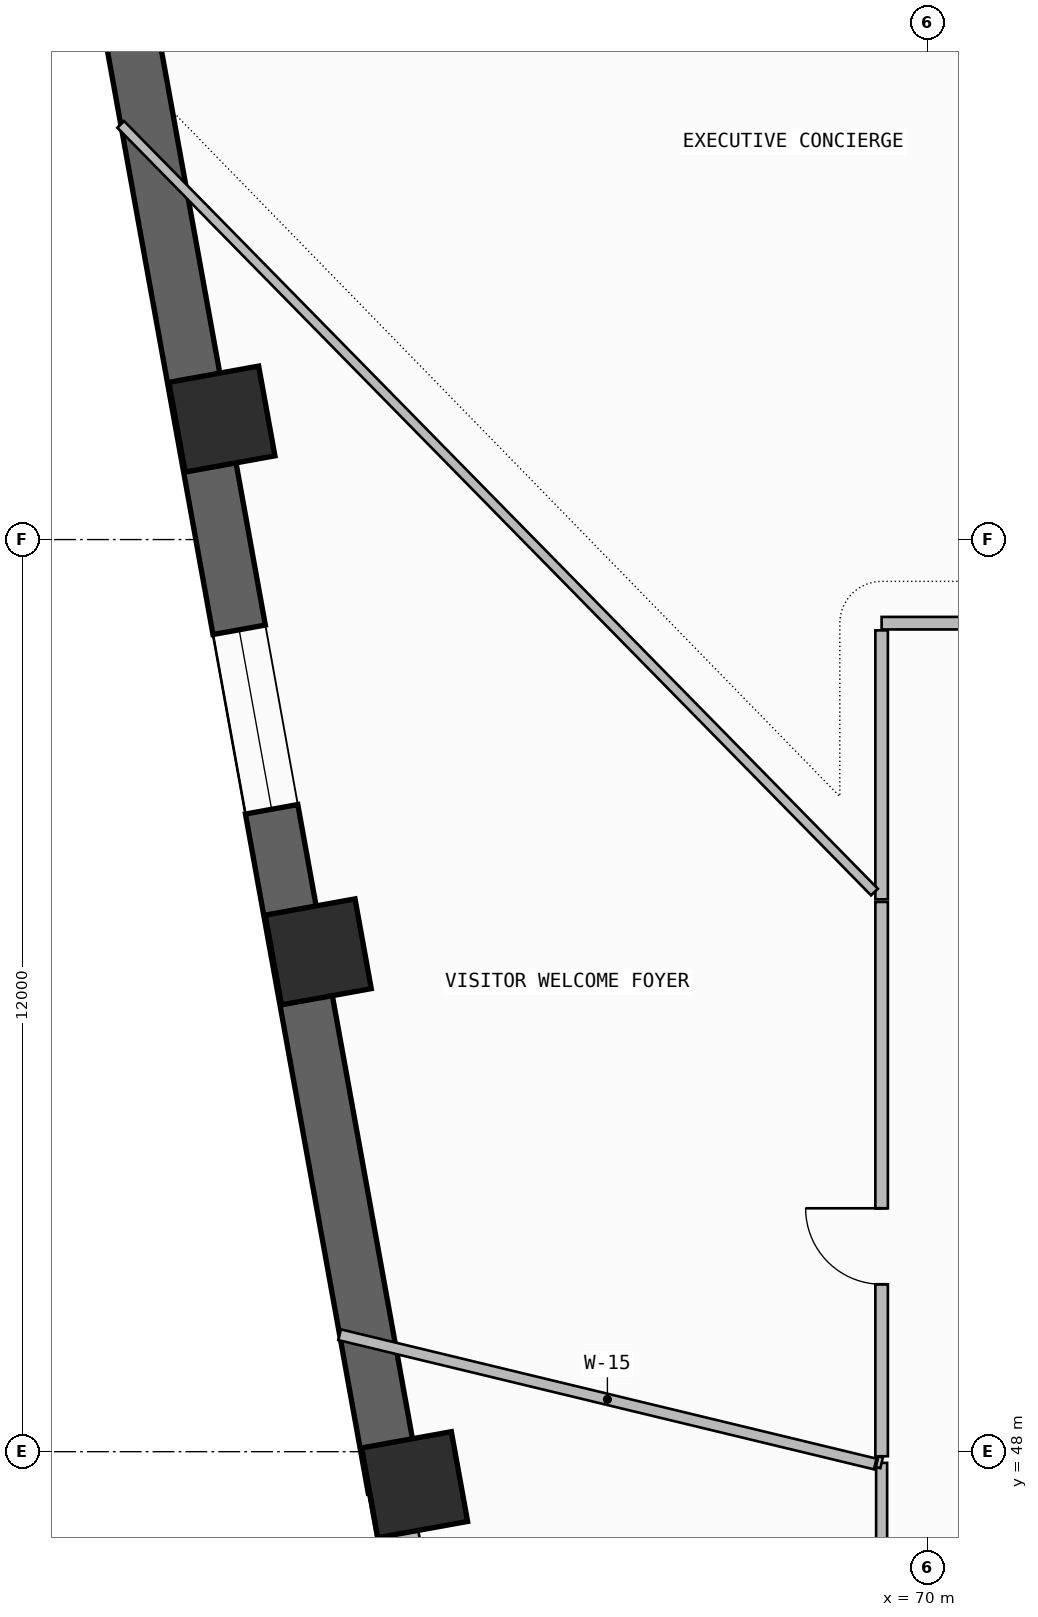
"""IFC4 building model, lengths in metres.
Left out: names, types, materials, properties, quantities, classifications, styles, units other than length and angle.
Written with IfcOpenShell. Run it as: python <this file> out.ifc"""

import sys

from ifc_helpers import new_model, si_unit, direction, frame, frame_2d, origin, origin_2d, place, context, subcontext, project, spatial, rectangle, extrude, element, fill, save


model = new_model("IFC4")
c1 = context("Model", 3, precision=1e-05, world=origin(), true_north=direction((0.0, 1.0)))
c2 = subcontext(c1, "Body", "Model", "MODEL_VIEW")
j1 = project(units=[si_unit("LENGTHUNIT", "METRE"), si_unit("PLANEANGLEUNIT", "RADIAN")], contexts=[c1])
p1 = place(None, origin())
s1 = spatial("IfcSite", under=j1, at=p1, CompositionType="ELEMENT")
p2 = place(p1, origin())
s2 = spatial("IfcBuilding", under=s1, at=p2, CompositionType="ELEMENT")
p3 = place(p2, frame((0.0, 0.0, 99.3)))
s3 = spatial("IfcBuildingStorey", under=s2, at=p3, CompositionType="ELEMENT", Elevation=99.3)
for number, where, z_axis, x_axis in (
    (1, (60.72, 61.585, 0.0), (0.0, 0.0, 1.0), (-0.178, 0.984, 0.0)),
    (2, (61.988, 54.575, 0.0), (0.0, 0.0, 1.0), (-0.178, 0.984, 0.0)),
    (3, (63.255, 47.566, 0.0), (0.0, 0.0, 1.0), (-0.178, 0.984, 0.0)),
):
    element("IfcColumn", number, at=place(p3, frame(where, z_axis=z_axis, x_axis=x_axis)), inside=s3, PredefinedType="COLUMN", context=c2, shape_type="SweptSolid", body=[
        extrude(rectangle(XDim=1.2, YDim=1.2, at=origin_2d()), origin(), (0.0, 0.0, 1.0), 3.6),
    ])
p4 = place(p3, frame((59.328, 67.768, -0.26), z_axis=(0.0, 0.0, 1.0), x_axis=(0.177933213615, -0.984042565895, 0.0)))
e4 = element("IfcWall", 4, at=p4, inside=s3, PredefinedType="SHEAR", context=c2, shape_type="SweptSolid", body=[
    extrude(rectangle(XDim=20.579, YDim=0.7, at=frame_2d((10.289, 0.0))), origin(), (0.0, 0.0, 1.0), 3.6),
])
p5 = place(p4, frame((9.1, 0.0, 1.2)))
e5 = element("IfcOpeningElement", 5, at=p5, cuts=e4, PredefinedType="OPENING", context=c2, shape_type="SweptSolid", body=[
    extrude(rectangle(XDim=2.4, YDim=0.9, at=frame_2d((1.2, 0.45))), frame((0.0, 0.36, 0.0), z_axis=(0.0, -1.0, 0.0), x_axis=(1.0, 0.0, 0.0)), (0.0, 0.0, 1.0), 0.72),
])
p6 = place(p3, frame((62.99, 47.518, 0.0), z_axis=(0.0, 0.0, 1.0), x_axis=(0.177948058674, -0.984039881516, 0.0)))
e6 = element("IfcWall", 6, at=p6, inside=s3, PredefinedType="SOLIDWALL", context=c2, shape_type="SweptSolid", body=[
    extrude(rectangle(XDim=13.455, YDim=0.42, at=frame_2d((6.728, 0.0))), origin(), (0.0, 0.0, 1.0), 2.725),
])
p7 = place(p6, frame((1.945, 0.0, 1.2)))
e7 = element("IfcOpeningElement", 7, at=p7, cuts=e6, PredefinedType="OPENING", context=c2, shape_type="SweptSolid", body=[
    extrude(rectangle(XDim=2.4, YDim=0.9, at=frame_2d((1.2, 0.45))), frame((0.0, 0.22, 0.0), z_axis=(0.0, -1.0, 0.0), x_axis=(1.0, 0.0, 0.0)), (0.0, 0.0, 1.0), 0.44),
])
p8 = place(p3, frame((88.921, 61.823, 0.0), z_axis=(0.0, 0.0, 1.0), x_axis=(-0.897993533426, 0.440008652103, 0.0)))
e8 = element("IfcWall", 8, at=p8, inside=s3, PredefinedType="PARAPET", context=c2, shape_type="SweptSolid", body=[
    extrude(rectangle(XDim=26.864, YDim=0.2, at=frame_2d((13.432, 0.0))), origin(), (0.0, 0.0, 1.0), 1.15),
])
p9 = place(p3, frame((69.4, 47.853, 0.0), z_axis=(0.0, 0.0, 1.0), x_axis=(0.0, -1.0, 0.0)))
e9 = element("IfcWall", 9, at=p9, inside=s3, PredefinedType="PARTITIONING", context=c2, shape_type="SweptSolid", body=[
    extrude(rectangle(XDim=5.413, YDim=0.145, at=frame_2d((2.707, 0.0))), origin(), (0.0, 0.0, 1.0), 3.34),
])
p10 = place(p9, frame((2.257, 0.0, 0.0)))
e10 = element("IfcOpeningElement", 10, at=p10, cuts=e9, PredefinedType="OPENING", context=c2, shape_type="SweptSolid", body=[
    extrude(rectangle(XDim=0.9, YDim=2.1, at=frame_2d((0.45, 1.05))), frame((0.0, 0.083, 0.0), z_axis=(0.0, -1.0, 0.0), x_axis=(1.0, 0.0, 0.0)), (0.0, 0.0, 1.0), 0.165),
])
p11 = place(p3, frame((69.34, 47.867, 0.0), z_axis=(0.0, 0.0, 1.0), x_axis=(0.972206912962, -0.234123297407, 0.0)))
e11 = element("IfcWall", 11, at=p11, inside=s3, PredefinedType="PARTITIONING", context=c2, shape_type="SweptSolid", body=[
    extrude(rectangle(XDim=0.062, YDim=0.145, at=frame_2d((0.031, 0.0))), origin(), (0.0, 0.0, 1.0), 3.34),
])
p12 = place(p3, frame((62.269, 49.539, 0.0), z_axis=(0.0, 0.0, 1.0), x_axis=(0.972098894047, -0.234571396793, 0.0)))
e12 = element("IfcWall", 12, at=p12, inside=s3, PredefinedType="PARTITIONING", context=c2, shape_type="SweptSolid", body=[
    extrude(rectangle(XDim=7.249, YDim=0.145, at=frame_2d((3.625, 0.0))), origin(), (0.0, 0.0, 1.0), 2.725),
])
p13 = place(p3, frame((75.948, 58.9, 0.0), z_axis=(0.0, 0.0, 1.0), x_axis=(-1.0, 0.0, 0.0)))
e13 = element("IfcWall", 13, at=p13, inside=s3, PredefinedType="PARTITIONING", context=c2, shape_type="SweptSolid", body=[
    extrude(rectangle(XDim=6.549, YDim=0.165, at=frame_2d((3.274, 0.0))), origin(), (0.0, 0.0, 1.0), 2.725),
])
p14 = place(p13, frame((2.002, 0.0, 0.0)))
e14 = element("IfcOpeningElement", 14, at=p14, cuts=e13, PredefinedType="OPENING", context=c2, shape_type="SweptSolid", body=[
    extrude(rectangle(XDim=1.0, YDim=2.2, at=frame_2d((0.5, 1.1))), frame((0.0, 0.093, 0.0), z_axis=(0.0, -1.0, 0.0), x_axis=(1.0, 0.0, 0.0)), (0.0, 0.0, 1.0), 0.185),
])
p15 = place(p3, frame((69.4, 58.805, 0.0), z_axis=(0.0, 0.0, 1.0), x_axis=(0.0, -1.0, 0.0)))
e15 = element("IfcWall", 15, at=p15, inside=s3, PredefinedType="PARTITIONING", context=c2, shape_type="SweptSolid", body=[
    extrude(rectangle(XDim=3.539, YDim=0.165, at=frame_2d((1.77, 0.0))), origin(), (0.0, 0.0, 1.0), 2.725),
])
p16 = place(p3, frame((69.305, 55.363, 0.0), z_axis=(0.0, 0.0, 1.0), x_axis=(-0.700626009677, 0.71352869218, 0.0)))
e16 = element("IfcWall", 16, at=p16, inside=s3, PredefinedType="PARTITIONING", context=c2, shape_type="SweptSolid", body=[
    extrude(rectangle(XDim=14.153, YDim=0.125, at=frame_2d((7.077, 0.0))), origin(), (0.0, 0.0, 1.0), 2.725),
])
p17 = place(p3, frame((69.4, 55.232, 0.0), z_axis=(0.0, 0.0, 1.0), x_axis=(0.0, -1.0, 0.0)))
e17 = element("IfcWall", 17, at=p17, inside=s3, PredefinedType="PARTITIONING", context=c2, shape_type="SweptSolid", body=[
    extrude(rectangle(XDim=7.292, YDim=0.165, at=frame_2d((3.646, 0.0))), origin(), (0.0, 0.0, 1.0), 2.725),
])
p18 = place(p17, frame((4.03, 0.0, 0.0)))
e18 = element("IfcOpeningElement", 18, at=p18, cuts=e17, PredefinedType="OPENING", context=c2, shape_type="SweptSolid", body=[
    extrude(rectangle(XDim=1.0, YDim=2.2, at=frame_2d((0.5, 1.1))), frame((0.0, 0.093, 0.0), z_axis=(0.0, -1.0, 0.0), x_axis=(1.0, 0.0, 0.0)), (0.0, 0.0, 1.0), 0.185),
])
p19 = place(p5, origin())
e19 = element("IfcWindow", 19, at=p19, inside=s3, PartitioningType="SINGLE_PANEL", PredefinedType="WINDOW", context=c2, shape_type="SweptSolid", body=[
    extrude(rectangle(XDim=2.4, YDim=0.9, at=frame_2d((1.2, 0.45))), frame((0.0, 0.03, 0.0), z_axis=(0.0, -1.0, 0.0), x_axis=(1.0, 0.0, 0.0)), (0.0, 0.0, 1.0), 0.06),
])
fill(e5, e19)
p20 = place(p18, frame((1.0, 0.0, 0.0), z_axis=(0.0, 0.0, 1.0), x_axis=(-1.0, 0.0, 0.0)))
e20 = element("IfcDoor", 20, at=p20, inside=s3, OperationType="SINGLE_SWING_RIGHT", PredefinedType="DOOR", context=c2, shape_type="SweptSolid", body=[
    extrude(rectangle(XDim=1.0, YDim=2.2, at=frame_2d((0.5, 1.1))), frame((0.0, 0.025, 0.0), z_axis=(0.0, -1.0, 0.0), x_axis=(1.0, 0.0, 0.0)), (0.0, 0.0, 1.0), 0.05),
])
fill(e18, e20)
save(model, sys.argv[1])
